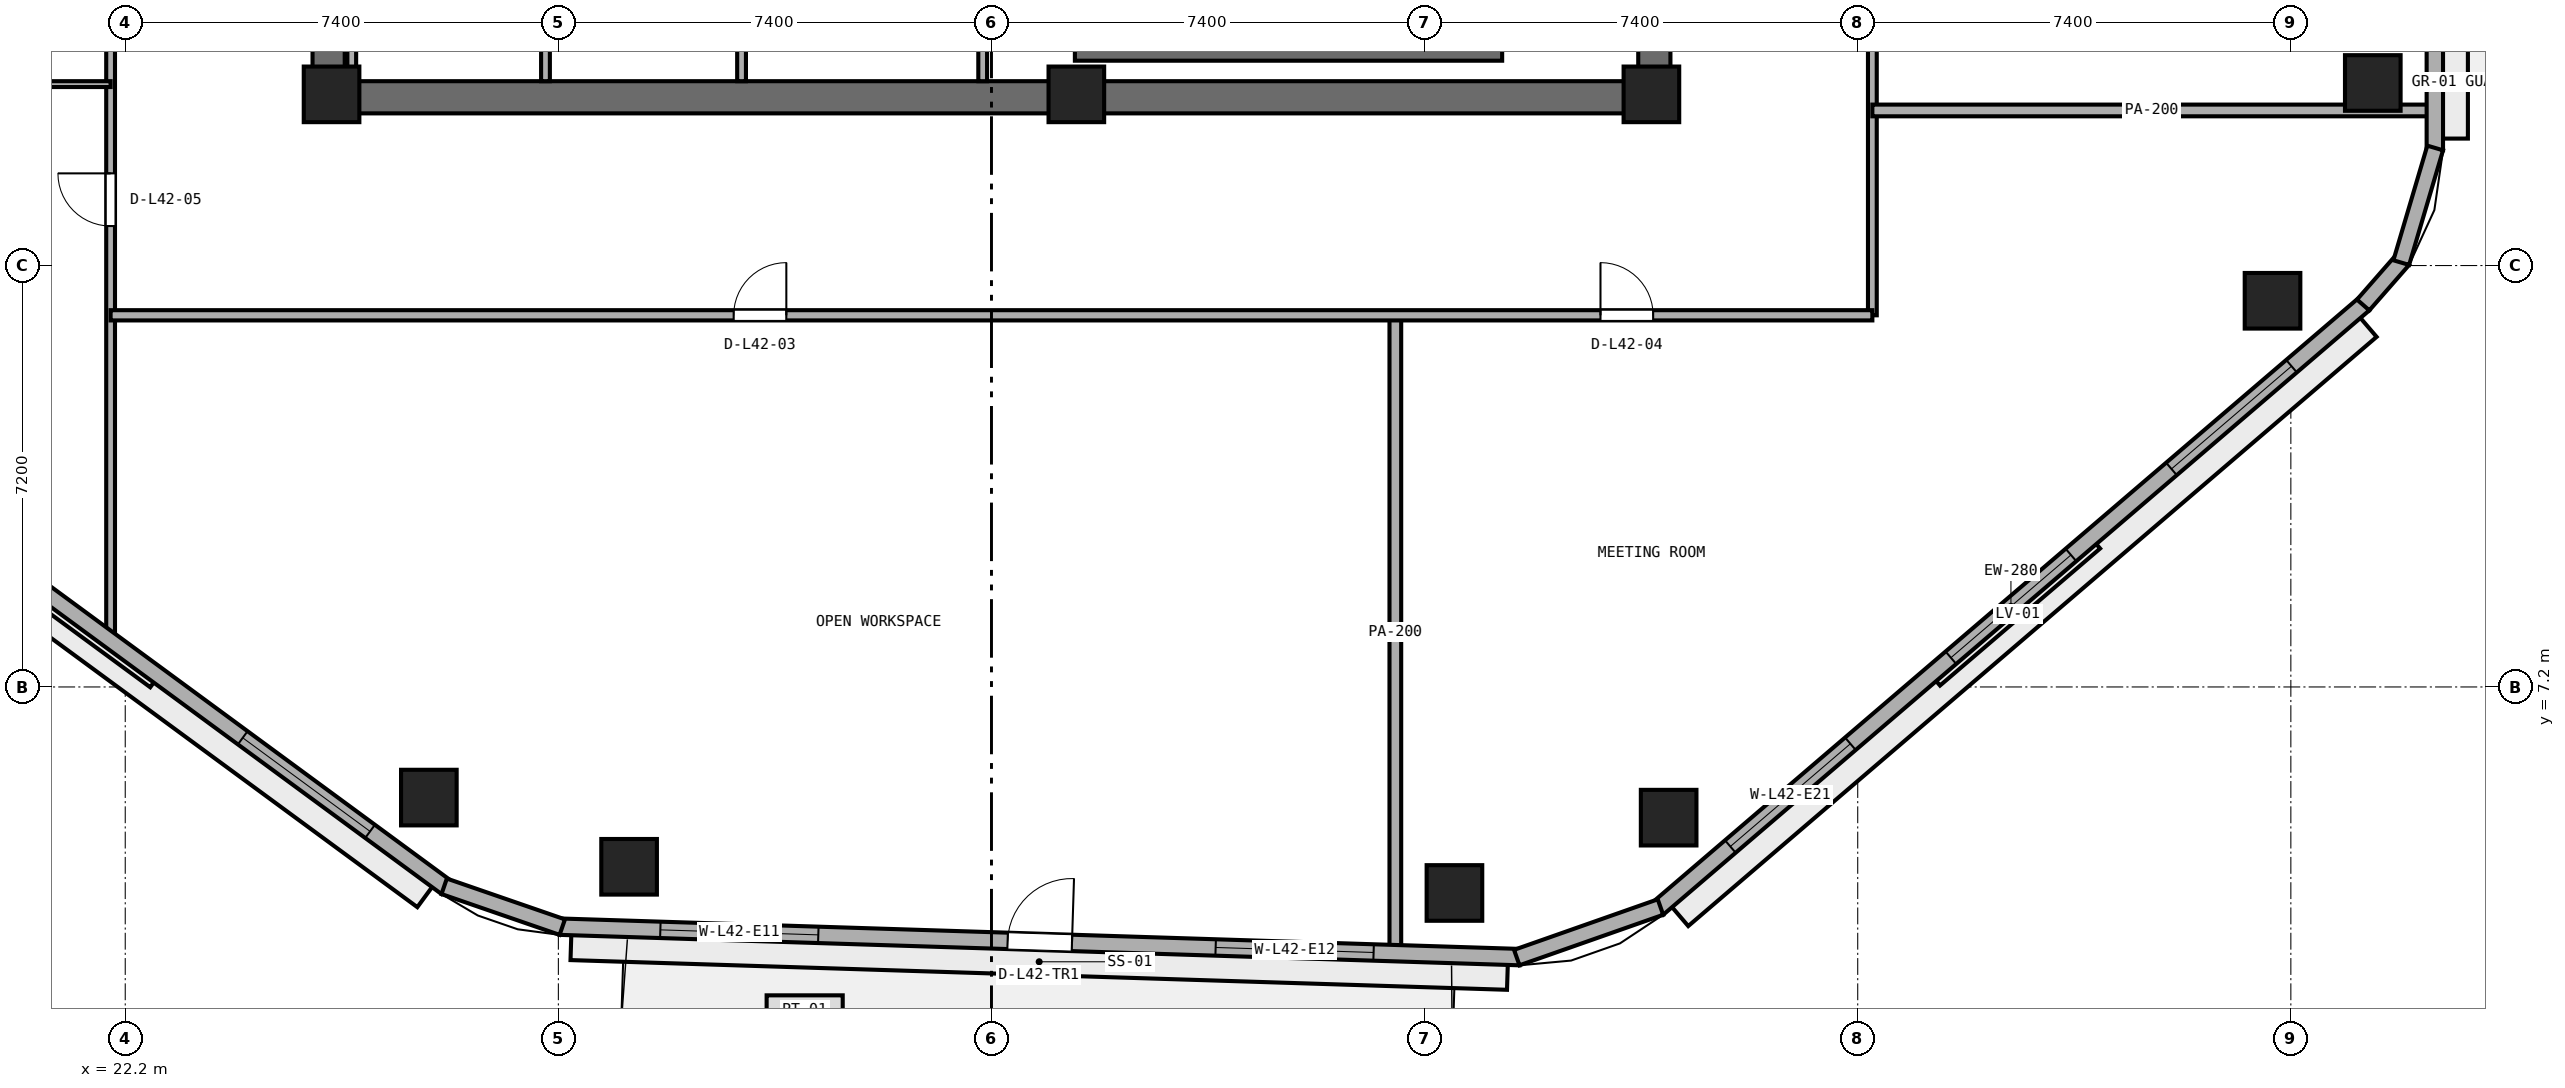
"""IFC4 building model, lengths in metres.
Left out: names, types, materials, properties, quantities, classifications, styles, units other than length and angle.
Written with IfcOpenShell. Run it as: python <this file> out.ifc"""

import sys

from ifc_helpers import new_model, si_unit, direction, frame, frame_2d, origin, origin_2d, place, context, subcontext, project, spatial, rectangle, extrude, element, fill, save


model = new_model("IFC4")
c1 = context("Model", 3, precision=1e-05, world=origin(), true_north=direction((0.0, 1.0)))
c2 = subcontext(c1, "Body", "Model", "MODEL_VIEW")
j1 = project(units=[si_unit("LENGTHUNIT", "METRE"), si_unit("PLANEANGLEUNIT", "RADIAN")], contexts=[c1])
p1 = place(None, origin())
s1 = spatial("IfcSite", under=j1, at=p1, CompositionType="ELEMENT")
p2 = place(p1, origin())
s2 = spatial("IfcBuilding", under=s1, at=p2, CompositionType="ELEMENT")
p3 = place(p2, frame((0.0, 0.0, 166.8)))
s3 = spatial("IfcBuildingStorey", under=s2, at=p3, CompositionType="ELEMENT", Elevation=166.8)
p4 = place(p3, frame((25.4, 17.275, 0.0), z_axis=(0.0, 0.0, 1.0), x_axis=(1.0, 0.0, 0.0)))
e1 = element("IfcWall", 1, at=p4, inside=s3, PredefinedType="SHEAR", context=c2, shape_type="SweptSolid", body=[
    extrude(rectangle(XDim=23.2, YDim=0.55, at=frame_2d((11.6, 0.0))), origin(), (0.0, 0.0, 1.0), 3.54),
])
p5 = place(p3, frame((25.675, 17.55, 0.0), z_axis=(0.0, 0.0, 1.0), x_axis=(0.0, 1.0, 0.0)))
e2 = element("IfcWall", 2, at=p5, inside=s3, PredefinedType="SHEAR", context=c2, shape_type="SweptSolid", body=[
    extrude(rectangle(XDim=15.3, YDim=0.55, at=frame_2d((7.65, 0.0))), origin(), (0.0, 0.0, 1.0), 3.54),
])
p6 = place(p5, frame((6.9, 0.0, 0.0)))
e3 = element("IfcOpeningElement", 3, at=p6, cuts=e2, PredefinedType="OPENING", context=c2, shape_type="SweptSolid", body=[
    extrude(rectangle(XDim=1.5, YDim=2.15, at=frame_2d((0.75, 1.075))), frame((0.0, 0.285, 0.0), z_axis=(0.0, -1.0, 0.0), x_axis=(1.0, 0.0, 0.0)), (0.0, 0.0, 1.0), 0.57),
])
p7 = place(p3, frame((48.325, 17.55, 0.0), z_axis=(0.0, 0.0, 1.0), x_axis=(0.0, 1.0, 0.0)))
e4 = element("IfcWall", 4, at=p7, inside=s3, PredefinedType="SHEAR", context=c2, shape_type="SweptSolid", body=[
    extrude(rectangle(XDim=15.3, YDim=0.55, at=frame_2d((7.65, 0.0))), origin(), (0.0, 0.0, 1.0), 3.54),
])
p8 = place(p7, frame((5.75, 0.0, 0.0)))
e5 = element("IfcOpeningElement", 5, at=p8, cuts=e4, PredefinedType="OPENING", context=c2, shape_type="SweptSolid", body=[
    extrude(rectangle(XDim=1.5, YDim=2.15, at=frame_2d((0.75, 1.075))), frame((0.0, 0.285, 0.0), z_axis=(0.0, -1.0, 0.0), x_axis=(1.0, 0.0, 0.0)), (0.0, 0.0, 1.0), 0.57),
])
for number, where, z_axis, x_axis in (
    (6, (25.725, 17.325, 0.0), (0.0, 0.0, 1.0), (1.0, 0.0, 0.0)),
    (7, (38.45, 17.325, 0.0), (0.0, 0.0, 1.0), (1.0, 0.0, 0.0)),
    (8, (48.275, 17.325, 0.0), (0.0, 0.0, 1.0), (1.0, 0.0, 0.0)),
):
    element("IfcColumn", number, at=place(p3, frame(where, z_axis=z_axis, x_axis=x_axis)), inside=s3, PredefinedType="PILASTER", context=c2, shape_type="SweptSolid", body=[
        extrude(rectangle(XDim=0.95, YDim=0.95, at=origin_2d()), origin(), (0.0, 0.0, 1.0), 3.8),
    ])
for number, where, z_axis, x_axis in (
    (9, (30.809, 4.127, 0.0), (0.0, 0.0, 1.0), (1.0, 0.0, 0.0)),
    (10, (44.91, 3.68, 0.0), (0.0, 0.0, 1.0), (1.0, 0.0, 0.0)),
    (11, (48.57, 4.967, 0.0), (0.0, 0.0, 1.0), (1.0, 0.0, 0.0)),
    (12, (58.887, 13.798, 0.0), (0.0, 0.0, 1.0), (1.0, 0.0, 0.0)),
    (13, (60.6, 17.519, 0.0), (0.0, 0.0, 1.0), (1.0, 0.0, 0.0)),
    (14, (27.387, 5.31, 0.0), (0.0, 0.0, 1.0), (1.0, 0.0, 0.0)),
):
    element("IfcColumn", number, at=place(p3, frame(where, z_axis=z_axis, x_axis=x_axis)), inside=s3, PredefinedType="COLUMN", context=c2, shape_type="SweptSolid", body=[
        extrude(rectangle(XDim=0.95, YDim=0.95, at=origin_2d()), origin(), (0.0, 0.0, 1.0), 3.8),
    ])
p9 = place(p3, frame((38.425, 18.025, 0.0), z_axis=(0.0, 0.0, 1.0), x_axis=(1.0, 0.0, 0.0)))
e15 = element("IfcWall", 15, at=p9, inside=s3, PredefinedType="SHEAR", context=c2, shape_type="SweptSolid", body=[
    extrude(rectangle(XDim=7.3, YDim=0.25, at=frame_2d((3.65, 0.0))), origin(), (0.0, 0.0, 1.0), 3.54),
])
p10 = place(p3, frame((26.07, 17.55, 0.0), z_axis=(0.0, 0.0, 1.0), x_axis=(0.0, 1.0, 0.0)))
e16 = element("IfcWall", 16, at=p10, inside=s3, PredefinedType="PARTITIONING", context=c2, shape_type="SweptSolid", body=[
    extrude(rectangle(XDim=2.2, YDim=0.15, at=frame_2d((1.1, 0.0))), origin(), (0.0, 0.0, 1.0), 2.64),
])
for number, where, z_axis, x_axis in (
    (17, (29.38, 17.55, 0.0), (0.0, 0.0, 1.0), (0.0, 1.0, 0.0)),
    (18, (32.73, 17.55, 0.0), (0.0, 0.0, 1.0), (0.0, 1.0, 0.0)),
    (19, (36.85, 17.55, 0.0), (0.0, 0.0, 1.0), (0.0, 1.0, 0.0)),
):
    element("IfcWall", number, at=place(p3, frame(where, z_axis=z_axis, x_axis=x_axis)), inside=s3, PredefinedType="PARTITIONING", context=c2, shape_type="SweptSolid", body=[
        extrude(rectangle(XDim=2.2, YDim=0.15, at=frame_2d((1.1, 0.0))), origin(), (0.0, 0.0, 1.0), 3.54),
    ])
p11 = place(p3, frame((52.05, 13.55, 0.0), z_axis=(0.0, 0.0, 1.0), x_axis=(0.0, 1.0, 0.0)))
e20 = element("IfcWall", 20, at=p11, inside=s3, PredefinedType="PARTITIONING", context=c2, shape_type="SweptSolid", body=[
    extrude(rectangle(XDim=10.3, YDim=0.15, at=frame_2d((5.15, 0.0))), origin(), (0.0, 0.0, 1.0), 3.54),
])
p12 = place(p3, frame((43.9, 2.717, 0.0), z_axis=(0.0, 0.0, 1.0), x_axis=(0.0, 1.0, 0.0)))
e21 = element("IfcWall", 21, at=p12, inside=s3, PredefinedType="PARTITIONING", context=c2, shape_type="SweptSolid", body=[
    extrude(rectangle(XDim=10.833, YDim=0.2, at=frame_2d((5.417, 0.0))), origin(), (0.0, 0.0, 1.0), 3.54),
])
p13 = place(p3, frame((21.95, 7.957, 0.0), z_axis=(0.0, 0.0, 1.0), x_axis=(0.0, 1.0, 0.0)))
e22 = element("IfcWall", 22, at=p13, inside=s3, PredefinedType="PARTITIONING", context=c2, shape_type="SweptSolid", body=[
    extrude(rectangle(XDim=15.894, YDim=0.15, at=frame_2d((7.947, 0.0))), origin(), (0.0, 0.0, 1.0), 3.54),
])
p14 = place(p13, frame((7.118, 0.0, 0.0)))
e23 = element("IfcOpeningElement", 23, at=p14, cuts=e22, PredefinedType="OPENING", context=c2, shape_type="SweptSolid", body=[
    extrude(rectangle(XDim=0.9, YDim=2.1, at=frame_2d((0.45, 1.05))), frame((0.0, 0.085, 0.0), z_axis=(0.0, -1.0, 0.0), x_axis=(1.0, 0.0, 0.0)), (0.0, 0.0, 1.0), 0.17),
])
p15 = place(p3, frame((21.95, 13.55, 0.0), z_axis=(0.0, 0.0, 1.0), x_axis=(1.0, 0.0, 0.0)))
e24 = element("IfcWall", 24, at=p15, inside=s3, PredefinedType="PARTITIONING", context=c2, shape_type="SweptSolid", body=[
    extrude(rectangle(XDim=30.1, YDim=0.175, at=frame_2d((15.05, 0.0))), origin(), (0.0, 0.0, 1.0), 3.54),
])
p16 = place(p15, frame((10.645, 0.0, 0.0)))
e25 = element("IfcOpeningElement", 25, at=p16, cuts=e24, PredefinedType="OPENING", context=c2, shape_type="SweptSolid", body=[
    extrude(rectangle(XDim=0.9, YDim=2.1, at=frame_2d((0.45, 1.05))), frame((0.0, 0.097, 0.0), z_axis=(0.0, -1.0, 0.0), x_axis=(1.0, 0.0, 0.0)), (0.0, 0.0, 1.0), 0.195),
])
p17 = place(p15, frame((25.455, 0.0, 0.0)))
e26 = element("IfcOpeningElement", 26, at=p17, cuts=e24, PredefinedType="OPENING", context=c2, shape_type="SweptSolid", body=[
    extrude(rectangle(XDim=0.9, YDim=2.1, at=frame_2d((0.45, 1.05))), frame((0.0, 0.097, 0.0), z_axis=(0.0, -1.0, 0.0), x_axis=(1.0, 0.0, 0.0)), (0.0, 0.0, 1.0), 0.195),
])
p18 = place(p3, frame((52.05, 17.05, 0.0), z_axis=(0.0, 0.0, 1.0), x_axis=(1.0, 0.0, 0.0)))
e27 = element("IfcWall", 27, at=p18, inside=s3, PredefinedType="PARTITIONING", context=c2, shape_type="SweptSolid", body=[
    extrude(rectangle(XDim=9.545, YDim=0.2, at=frame_2d((4.772, 0.0))), origin(), (0.0, 0.0, 1.0), 3.54),
])
p19 = place(p3, frame((13.605, 17.5, 0.0), z_axis=(0.0, 0.0, 1.0), x_axis=(1.0, 0.0, 0.0)))
e28 = element("IfcWall", 28, at=p19, inside=s3, PredefinedType="PARTITIONING", context=c2, shape_type="SweptSolid", body=[
    extrude(rectangle(XDim=8.345, YDim=0.1, at=frame_2d((4.172, 0.0))), origin(), (0.0, 0.0, 1.0), 2.923),
])
p20 = place(p3, frame((29.625, 3.104, 0.0), z_axis=(0.0, 0.0, 1.0), x_axis=(0.99949718661, -0.031707632487, 0.0)))
e29 = element("IfcWall", 29, at=p20, inside=s3, PredefinedType="STANDARD", context=c2, shape_type="SweptSolid", body=[
    extrude(rectangle(XDim=16.408, YDim=0.28, at=frame_2d((8.204, 0.0))), origin(), (0.0, 0.0, 1.0), 3.54),
])
p21 = place(p20, frame((7.654, 0.0, 0.0)))
e30 = element("IfcOpeningElement", 30, at=p21, cuts=e29, PredefinedType="OPENING", context=c2, shape_type="SweptSolid", body=[
    extrude(rectangle(XDim=1.1, YDim=2.2, at=frame_2d((0.55, 1.1))), frame((0.0, 0.15, 0.0), z_axis=(0.0, -1.0, 0.0), x_axis=(1.0, 0.0, 0.0)), (0.0, 0.0, 1.0), 0.3),
])
p22 = place(p20, frame((1.718, 0.0, 0.9)))
e31 = element("IfcOpeningElement", 31, at=p22, cuts=e29, PredefinedType="OPENING", context=c2, shape_type="SweptSolid", body=[
    extrude(rectangle(XDim=2.7, YDim=1.75, at=frame_2d((1.35, 0.875))), frame((0.0, 0.15, 0.0), z_axis=(0.0, -1.0, 0.0), x_axis=(1.0, 0.0, 0.0)), (0.0, 0.0, 1.0), 0.3),
])
p23 = place(p20, frame((11.21, 0.0, 0.9)))
e32 = element("IfcOpeningElement", 32, at=p23, cuts=e29, PredefinedType="OPENING", context=c2, shape_type="SweptSolid", body=[
    extrude(rectangle(XDim=2.7, YDim=1.75, at=frame_2d((1.35, 0.875))), frame((0.0, 0.15, 0.0), z_axis=(0.0, -1.0, 0.0), x_axis=(1.0, 0.0, 0.0)), (0.0, 0.0, 1.0), 0.3),
])
p24 = place(p3, frame((48.385, 3.414, 0.0), z_axis=(0.0, 0.0, 1.0), x_axis=(0.759700260779, 0.650273414628, 0.0)))
e33 = element("IfcWall", 33, at=p24, inside=s3, PredefinedType="STANDARD", context=c2, shape_type="SweptSolid", body=[
    extrude(rectangle(XDim=15.881, YDim=0.28, at=frame_2d((7.94, 0.0))), origin(), (0.0, 0.0, 1.0), 3.54),
])
p25 = place(p24, frame((1.63, 0.0, 0.9)))
e34 = element("IfcOpeningElement", 34, at=p25, cuts=e33, PredefinedType="OPENING", context=c2, shape_type="SweptSolid", body=[
    extrude(rectangle(XDim=2.7, YDim=1.75, at=frame_2d((1.35, 0.875))), frame((0.0, 0.15, 0.0), z_axis=(0.0, -1.0, 0.0), x_axis=(1.0, 0.0, 0.0)), (0.0, 0.0, 1.0), 0.3),
])
p26 = place(p24, frame((6.59, 0.0, 0.9)))
e35 = element("IfcOpeningElement", 35, at=p26, cuts=e33, PredefinedType="OPENING", context=c2, shape_type="SweptSolid", body=[
    extrude(rectangle(XDim=2.7, YDim=1.75, at=frame_2d((1.35, 0.875))), frame((0.0, 0.15, 0.0), z_axis=(0.0, -1.0, 0.0), x_axis=(1.0, 0.0, 0.0)), (0.0, 0.0, 1.0), 0.3),
])
p27 = place(p24, frame((11.551, 0.0, 0.9)))
e36 = element("IfcOpeningElement", 36, at=p27, cuts=e33, PredefinedType="OPENING", context=c2, shape_type="SweptSolid", body=[
    extrude(rectangle(XDim=2.7, YDim=1.75, at=frame_2d((1.35, 0.875))), frame((0.0, 0.15, 0.0), z_axis=(0.0, -1.0, 0.0), x_axis=(1.0, 0.0, 0.0)), (0.0, 0.0, 1.0), 0.3),
])
p28 = place(p3, frame((61.66, 16.369, 0.0), z_axis=(0.0, 0.0, 1.0), x_axis=(0.0, 1.0, 0.0)))
e37 = element("IfcWall", 37, at=p28, inside=s3, PredefinedType="STANDARD", context=c2, shape_type="SweptSolid", body=[
    extrude(rectangle(XDim=18.902, YDim=0.28, at=frame_2d((9.451, 0.0))), origin(), (0.0, 0.0, 1.0), 3.54),
])
p29 = place(p28, frame((8.601, 0.0, 0.0)))
e38 = element("IfcOpeningElement", 38, at=p29, cuts=e37, PredefinedType="OPENING", context=c2, shape_type="SweptSolid", body=[
    extrude(rectangle(XDim=1.1, YDim=2.2, at=frame_2d((0.55, 1.1))), frame((0.0, 0.15, 0.0), z_axis=(0.0, -1.0, 0.0), x_axis=(1.0, 0.0, 0.0)), (0.0, 0.0, 1.0), 0.3),
])
p30 = place(p28, frame((2.134, 0.0, 0.9)))
e39 = element("IfcOpeningElement", 39, at=p30, cuts=e37, PredefinedType="OPENING", context=c2, shape_type="SweptSolid", body=[
    extrude(rectangle(XDim=2.7, YDim=1.75, at=frame_2d((1.35, 0.875))), frame((0.0, 0.15, 0.0), z_axis=(0.0, -1.0, 0.0), x_axis=(1.0, 0.0, 0.0)), (0.0, 0.0, 1.0), 0.3),
])
p31 = place(p28, frame((14.069, 0.0, 0.9)))
e40 = element("IfcOpeningElement", 40, at=p31, cuts=e37, PredefinedType="OPENING", context=c2, shape_type="SweptSolid", body=[
    extrude(rectangle(XDim=2.7, YDim=1.75, at=frame_2d((1.35, 0.875))), frame((0.0, 0.15, 0.0), z_axis=(0.0, -1.0, 0.0), x_axis=(1.0, 0.0, 0.0)), (0.0, 0.0, 1.0), 0.3),
])
p32 = place(p3, frame((14.951, 13.134, 0.0), z_axis=(0.0, 0.0, 1.0), x_axis=(0.805804940328, -0.592181051827, 0.0)))
e41 = element("IfcWall", 41, at=p32, inside=s3, PredefinedType="STANDARD", context=c2, shape_type="SweptSolid", body=[
    extrude(rectangle(XDim=15.804, YDim=0.28, at=frame_2d((7.902, 0.0))), origin(), (0.0, 0.0, 1.0), 3.54),
])
p33 = place(p32, frame((1.617, 0.0, 0.9)))
e42 = element("IfcOpeningElement", 42, at=p33, cuts=e41, PredefinedType="OPENING", context=c2, shape_type="SweptSolid", body=[
    extrude(rectangle(XDim=2.7, YDim=1.75, at=frame_2d((1.35, 0.875))), frame((0.0, 0.15, 0.0), z_axis=(0.0, -1.0, 0.0), x_axis=(1.0, 0.0, 0.0)), (0.0, 0.0, 1.0), 0.3),
])
p34 = place(p32, frame((11.487, 0.0, 0.9)))
e43 = element("IfcOpeningElement", 43, at=p34, cuts=e41, PredefinedType="OPENING", context=c2, shape_type="SweptSolid", body=[
    extrude(rectangle(XDim=2.7, YDim=1.75, at=frame_2d((1.35, 0.875))), frame((0.0, 0.15, 0.0), z_axis=(0.0, -1.0, 0.0), x_axis=(1.0, 0.0, 0.0)), (0.0, 0.0, 1.0), 0.3),
])
p35 = place(p3, frame((45.975, 2.576, 0.0), z_axis=(0.0, 0.0, 1.0), x_axis=(0.943377643365, 0.331720698781, 0.0)))
e44 = element("IfcWall", 44, at=p35, inside=s3, PredefinedType="STANDARD", context=c2, shape_type="SweptSolid", body=[
    extrude(rectangle(XDim=2.603, YDim=0.28, at=frame_2d((1.301, 0.0))), origin(), (0.0, 0.0, 1.0), 3.54),
])
p36 = place(p3, frame((60.436, 13.727, 0.0), z_axis=(0.0, 0.0, 1.0), x_axis=(0.658571618609, 0.752518055041, 0.0)))
e45 = element("IfcWall", 45, at=p36, inside=s3, PredefinedType="STANDARD", context=c2, shape_type="SweptSolid", body=[
    extrude(rectangle(XDim=1.032, YDim=0.28, at=frame_2d((0.516, 0.0))), origin(), (0.0, 0.0, 1.0), 3.54),
])
p37 = place(p3, frame((61.086, 14.45, 0.0), z_axis=(0.0, 0.0, 1.0), x_axis=(0.283660953453, 0.958924639107, 0.0)))
e46 = element("IfcWall", 46, at=p37, inside=s3, PredefinedType="STANDARD", context=c2, shape_type="SweptSolid", body=[
    extrude(rectangle(XDim=2.042, YDim=0.28, at=frame_2d((1.021, 0.0))), origin(), (0.0, 0.0, 1.0), 3.54),
])
p38 = place(p3, frame((27.649, 3.794, 0.0), z_axis=(0.0, 0.0, 1.0), x_axis=(0.945149124969, -0.326639145802, 0.0)))
e47 = element("IfcWall", 47, at=p38, inside=s3, PredefinedType="STANDARD", context=c2, shape_type="SweptSolid", body=[
    extrude(rectangle(XDim=2.135, YDim=0.28, at=frame_2d((1.067, 0.0))), origin(), (0.0, 0.0, 1.0), 3.54),
])
p39 = place(p16, origin())
e48 = element("IfcDoor", 48, at=p39, inside=s3, OperationType="SINGLE_SWING_RIGHT", PredefinedType="DOOR", context=c2, shape_type="SweptSolid", body=[
    extrude(rectangle(XDim=0.9, YDim=2.1, at=frame_2d((0.45, 1.05))), frame((0.0, 0.025, 0.0), z_axis=(0.0, -1.0, 0.0), x_axis=(1.0, 0.0, 0.0)), (0.0, 0.0, 1.0), 0.05),
])
fill(e25, e48)
p40 = place(p17, origin())
e49 = element("IfcDoor", 49, at=p40, inside=s3, OperationType="SINGLE_SWING_LEFT", PredefinedType="DOOR", context=c2, shape_type="SweptSolid", body=[
    extrude(rectangle(XDim=0.9, YDim=2.1, at=frame_2d((0.45, 1.05))), frame((0.0, 0.025, 0.0), z_axis=(0.0, -1.0, 0.0), x_axis=(1.0, 0.0, 0.0)), (0.0, 0.0, 1.0), 0.05),
])
fill(e26, e49)
p41 = place(p14, origin())
e50 = element("IfcDoor", 50, at=p41, inside=s3, OperationType="SINGLE_SWING_RIGHT", PredefinedType="DOOR", context=c2, shape_type="SweptSolid", body=[
    extrude(rectangle(XDim=0.9, YDim=2.1, at=frame_2d((0.45, 1.05))), frame((0.0, 0.025, 0.0), z_axis=(0.0, -1.0, 0.0), x_axis=(1.0, 0.0, 0.0)), (0.0, 0.0, 1.0), 0.05),
])
fill(e23, e50)
p42 = place(p21, origin())
e51 = element("IfcDoor", 51, at=p42, inside=s3, OperationType="SINGLE_SWING_RIGHT", PredefinedType="DOOR", context=c2, shape_type="SweptSolid", body=[
    extrude(rectangle(XDim=1.1, YDim=2.2, at=frame_2d((0.55, 1.1))), frame((0.0, 0.025, 0.0), z_axis=(0.0, -1.0, 0.0), x_axis=(1.0, 0.0, 0.0)), (0.0, 0.0, 1.0), 0.05),
])
fill(e30, e51)
p43 = place(p22, origin())
e52 = element("IfcWindow", 52, at=p43, inside=s3, PartitioningType="SINGLE_PANEL", PredefinedType="WINDOW", context=c2, shape_type="SweptSolid", body=[
    extrude(rectangle(XDim=2.7, YDim=1.75, at=frame_2d((1.35, 0.875))), frame((0.0, 0.03, 0.0), z_axis=(0.0, -1.0, 0.0), x_axis=(1.0, 0.0, 0.0)), (0.0, 0.0, 1.0), 0.06),
])
fill(e31, e52)
p44 = place(p23, origin())
e53 = element("IfcWindow", 53, at=p44, inside=s3, PartitioningType="SINGLE_PANEL", PredefinedType="WINDOW", context=c2, shape_type="SweptSolid", body=[
    extrude(rectangle(XDim=2.7, YDim=1.75, at=frame_2d((1.35, 0.875))), frame((0.0, 0.03, 0.0), z_axis=(0.0, -1.0, 0.0), x_axis=(1.0, 0.0, 0.0)), (0.0, 0.0, 1.0), 0.06),
])
fill(e32, e53)
p45 = place(p25, origin())
e54 = element("IfcWindow", 54, at=p45, inside=s3, PartitioningType="SINGLE_PANEL", PredefinedType="WINDOW", context=c2, shape_type="SweptSolid", body=[
    extrude(rectangle(XDim=2.7, YDim=1.75, at=frame_2d((1.35, 0.875))), frame((0.0, 0.03, 0.0), z_axis=(0.0, -1.0, 0.0), x_axis=(1.0, 0.0, 0.0)), (0.0, 0.0, 1.0), 0.06),
])
fill(e34, e54)
p46 = place(p26, origin())
e55 = element("IfcWindow", 55, at=p46, inside=s3, PartitioningType="SINGLE_PANEL", PredefinedType="WINDOW", context=c2, shape_type="SweptSolid", body=[
    extrude(rectangle(XDim=2.7, YDim=1.75, at=frame_2d((1.35, 0.875))), frame((0.0, 0.03, 0.0), z_axis=(0.0, -1.0, 0.0), x_axis=(1.0, 0.0, 0.0)), (0.0, 0.0, 1.0), 0.06),
])
fill(e35, e55)
p47 = place(p27, origin())
e56 = element("IfcWindow", 56, at=p47, inside=s3, PartitioningType="SINGLE_PANEL", PredefinedType="WINDOW", context=c2, shape_type="SweptSolid", body=[
    extrude(rectangle(XDim=2.7, YDim=1.75, at=frame_2d((1.35, 0.875))), frame((0.0, 0.03, 0.0), z_axis=(0.0, -1.0, 0.0), x_axis=(1.0, 0.0, 0.0)), (0.0, 0.0, 1.0), 0.06),
])
fill(e36, e56)
p48 = place(p34, origin())
e57 = element("IfcWindow", 57, at=p48, inside=s3, PartitioningType="SINGLE_PANEL", PredefinedType="WINDOW", context=c2, shape_type="SweptSolid", body=[
    extrude(rectangle(XDim=2.7, YDim=1.75, at=frame_2d((1.35, 0.875))), frame((0.0, 0.03, 0.0), z_axis=(0.0, -1.0, 0.0), x_axis=(1.0, 0.0, 0.0)), (0.0, 0.0, 1.0), 0.06),
])
fill(e43, e57)
save(model, sys.argv[1])
